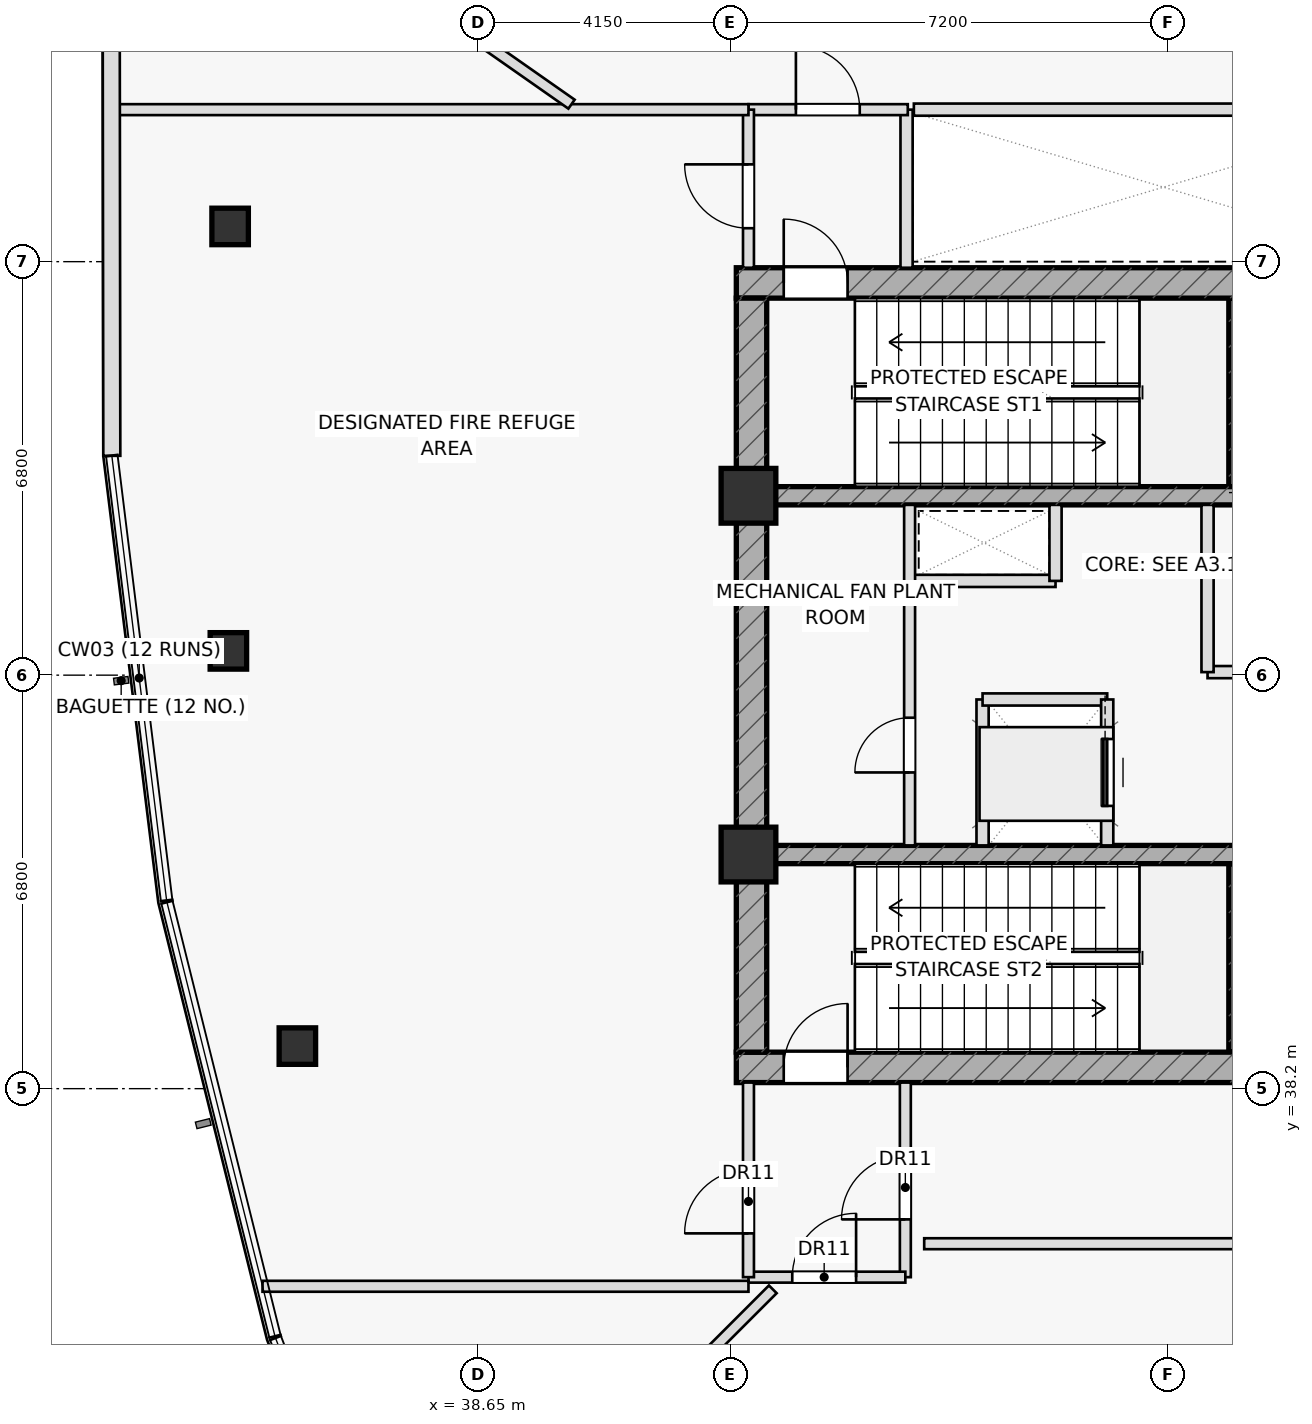
"""IFC4 building model, lengths in metres.
Left out: names, types, materials, properties, quantities, classifications, styles, units other than length and angle.
Written with IfcOpenShell. Run it as: python <this file> out.ifc"""

import sys

from ifc_helpers import new_model, si_unit, direction, frame, frame_2d, origin, origin_2d, place, context, subcontext, project, spatial, rectangle, hollow_rectangle, extrude, element, fill, save


model = new_model("IFC4")
c1 = context("Model", 3, precision=1e-05, world=origin(), true_north=direction((0.0, 1.0)))
c2 = subcontext(c1, "Body", "Model", "MODEL_VIEW")
j1 = project(units=[si_unit("LENGTHUNIT", "METRE"), si_unit("PLANEANGLEUNIT", "RADIAN")], contexts=[c1])
p1 = place(None, origin())
s1 = spatial("IfcSite", under=j1, at=p1, CompositionType="ELEMENT")
p2 = place(p1, origin())
s2 = spatial("IfcBuilding", under=s1, at=p2, CompositionType="ELEMENT")
p3 = place(p2, frame((0.0, 0.0, 204.15)))
s3 = spatial("IfcBuildingStorey", under=s2, at=p3, CompositionType="ELEMENT", Elevation=204.15)
for number, where, z_axis, x_axis in (
    (1, (51.11, 48.1, 0.0), (0.0, 0.0, 1.0), (0.0, 1.0, 0.0)),
    (2, (51.11, 38.8, 0.0), (0.0, 0.0, 1.0), (0.0, 1.0, 0.0)),
):
    element("IfcWall", number, at=place(p3, frame(where, z_axis=z_axis, x_axis=x_axis)), inside=s3, PredefinedType="SHEAR", context=c2, shape_type="SweptSolid", body=[
        extrude(rectangle(XDim=3.1, YDim=0.22, at=frame_2d((1.55, 0.0))), origin(), (0.0, 0.0, 1.0), 4.55),
    ])
p4 = place(p3, frame((42.9, 51.45, 0.0), z_axis=(0.0, 0.0, 1.0), x_axis=(1.0, 0.0, 0.0)))
e3 = element("IfcWall", 3, at=p4, inside=s3, PredefinedType="SHEAR", context=c2, shape_type="SweptSolid", body=[
    extrude(rectangle(XDim=14.2, YDim=0.5, at=frame_2d((7.1, 0.0))), origin(), (0.0, 0.0, 1.0), 4.55),
])
p5 = place(p4, frame((0.78, 0.0, 0.0)))
e4 = element("IfcOpeningElement", 4, at=p5, cuts=e3, PredefinedType="OPENING", context=c2, shape_type="SweptSolid", body=[
    extrude(rectangle(XDim=1.05, YDim=2.2, at=frame_2d((0.525, 1.1))), frame((0.0, 0.26, 0.0), z_axis=(0.0, -1.0, 0.0), x_axis=(1.0, 0.0, 0.0)), (0.0, 0.0, 1.0), 0.52),
])
p6 = place(p3, frame((42.9, 38.55, 0.0), z_axis=(0.0, 0.0, 1.0), x_axis=(1.0, 0.0, 0.0)))
e5 = element("IfcWall", 5, at=p6, inside=s3, PredefinedType="SHEAR", context=c2, shape_type="SweptSolid", body=[
    extrude(rectangle(XDim=14.2, YDim=0.5, at=frame_2d((7.1, 0.0))), origin(), (0.0, 0.0, 1.0), 4.55),
])
p7 = place(p6, frame((0.78, 0.0, 0.0)))
e6 = element("IfcOpeningElement", 6, at=p7, cuts=e5, PredefinedType="OPENING", context=c2, shape_type="SweptSolid", body=[
    extrude(rectangle(XDim=1.05, YDim=2.2, at=frame_2d((0.525, 1.1))), frame((0.0, 0.26, 0.0), z_axis=(0.0, -1.0, 0.0), x_axis=(1.0, 0.0, 0.0)), (0.0, 0.0, 1.0), 0.52),
])
p8 = place(p3, frame((43.15, 38.8, 0.0), z_axis=(0.0, 0.0, 1.0), x_axis=(0.0, 1.0, 0.0)))
e7 = element("IfcWall", 7, at=p8, inside=s3, PredefinedType="SHEAR", context=c2, shape_type="SweptSolid", body=[
    extrude(rectangle(XDim=12.4, YDim=0.5, at=frame_2d((6.2, 0.0))), origin(), (0.0, 0.0, 1.0), 4.55),
])
p9 = place(p3, frame((43.4, 47.95, 0.0), z_axis=(0.0, 0.0, 1.0), x_axis=(1.0, 0.0, 0.0)))
e8 = element("IfcWall", 8, at=p9, inside=s3, PredefinedType="SHEAR", context=c2, shape_type="SweptSolid", body=[
    extrude(rectangle(XDim=13.2, YDim=0.3, at=frame_2d((6.6, 0.0))), origin(), (0.0, 0.0, 1.0), 4.55),
])
p10 = place(p9, frame((8.345, 0.0, 0.0)))
e9 = element("IfcOpeningElement", 9, at=p10, cuts=e8, PredefinedType="OPENING", context=c2, shape_type="SweptSolid", body=[
    extrude(rectangle(XDim=1.15, YDim=2.2, at=frame_2d((0.575, 1.1))), frame((0.0, 0.16, 0.0), z_axis=(0.0, -1.0, 0.0), x_axis=(1.0, 0.0, 0.0)), (0.0, 0.0, 1.0), 0.32),
])
p11 = place(p9, frame((10.065, 0.0, 0.0)))
e10 = element("IfcOpeningElement", 10, at=p11, cuts=e8, PredefinedType="OPENING", context=c2, shape_type="SweptSolid", body=[
    extrude(rectangle(XDim=1.15, YDim=2.2, at=frame_2d((0.575, 1.1))), frame((0.0, 0.16, 0.0), z_axis=(0.0, -1.0, 0.0), x_axis=(1.0, 0.0, 0.0)), (0.0, 0.0, 1.0), 0.32),
])
p12 = place(p9, frame((11.645, 0.0, 0.0)))
e11 = element("IfcOpeningElement", 11, at=p12, cuts=e8, PredefinedType="OPENING", context=c2, shape_type="SweptSolid", body=[
    extrude(rectangle(XDim=1.15, YDim=2.2, at=frame_2d((0.575, 1.1))), frame((0.0, 0.16, 0.0), z_axis=(0.0, -1.0, 0.0), x_axis=(1.0, 0.0, 0.0)), (0.0, 0.0, 1.0), 0.32),
])
p13 = place(p3, frame((43.4, 42.05, 0.0), z_axis=(0.0, 0.0, 1.0), x_axis=(1.0, 0.0, 0.0)))
e12 = element("IfcWall", 12, at=p13, inside=s3, PredefinedType="SHEAR", context=c2, shape_type="SweptSolid", body=[
    extrude(rectangle(XDim=13.2, YDim=0.3, at=frame_2d((6.6, 0.0))), origin(), (0.0, 0.0, 1.0), 4.55),
])
p14 = place(p13, frame((8.37, 0.0, 0.0)))
e13 = element("IfcOpeningElement", 13, at=p14, cuts=e12, PredefinedType="OPENING", context=c2, shape_type="SweptSolid", body=[
    extrude(rectangle(XDim=1.1, YDim=2.15, at=frame_2d((0.55, 1.075))), frame((0.0, 0.16, 0.0), z_axis=(0.0, -1.0, 0.0), x_axis=(1.0, 0.0, 0.0)), (0.0, 0.0, 1.0), 0.32),
])
p15 = place(p13, frame((10.09, 0.0, 0.0)))
e14 = element("IfcOpeningElement", 14, at=p15, cuts=e12, PredefinedType="OPENING", context=c2, shape_type="SweptSolid", body=[
    extrude(rectangle(XDim=1.1, YDim=2.15, at=frame_2d((0.55, 1.075))), frame((0.0, 0.16, 0.0), z_axis=(0.0, -1.0, 0.0), x_axis=(1.0, 0.0, 0.0)), (0.0, 0.0, 1.0), 0.32),
])
p16 = place(p13, frame((11.83, 0.0, 0.0)))
e15 = element("IfcOpeningElement", 15, at=p16, cuts=e12, PredefinedType="OPENING", context=c2, shape_type="SweptSolid", body=[
    extrude(rectangle(XDim=1.1, YDim=2.15, at=frame_2d((0.55, 1.075))), frame((0.0, 0.16, 0.0), z_axis=(0.0, -1.0, 0.0), x_axis=(1.0, 0.0, 0.0)), (0.0, 0.0, 1.0), 0.32),
])
for number, where, z_axis, x_axis in (
    (16, (43.1, 47.95, 0.0), (0.0, 0.0, 1.0), (1.0, 0.0, 0.0)),
    (17, (43.1, 42.05, 0.0), (0.0, 0.0, 1.0), (1.0, 0.0, 0.0)),
):
    element("IfcColumn", number, at=place(p3, frame(where, z_axis=z_axis, x_axis=x_axis)), inside=s3, PredefinedType="COLUMN", context=c2, shape_type="SweptSolid", body=[
        extrude(rectangle(XDim=0.9, YDim=0.9, at=origin_2d()), origin(), (0.0, 0.0, 1.0), 4.55),
    ])
for number, where, z_axis, x_axis in (
    (18, (34.575, 52.379, 0.0), (0.0, 0.0, 1.0), (1.0, 0.0, 0.0)),
    (19, (34.546, 45.399, 0.0), (0.0, 0.0, 1.0), (1.0, 0.0, 0.0)),
    (20, (35.681, 38.9, 0.0), (0.0, 0.0, 1.0), (1.0, 0.0, 0.0)),
):
    element("IfcColumn", number, at=place(p3, frame(where, z_axis=z_axis, x_axis=x_axis)), inside=s3, PredefinedType="COLUMN", context=c2, shape_type="SweptSolid", body=[
        extrude(hollow_rectangle(XDim=0.6, YDim=0.6, WallThickness=0.036, at=origin_2d()), origin(), (0.0, 0.0, 1.0), 4.55),
    ])
p17 = place(p3, frame((45.7, 51.7, 0.0), z_axis=(0.0, 0.0, 1.0), x_axis=(0.0, 1.0, 0.0)))
e21 = element("IfcWall", 21, at=p17, inside=s3, PredefinedType="PARTITIONING", context=c2, shape_type="SweptSolid", body=[
    extrude(rectangle(XDim=2.6, YDim=0.2, at=frame_2d((1.3, 0.0))), origin(), (0.0, 0.0, 1.0), 4.55),
])
p18 = place(p3, frame((45.75, 46.55, 0.0), z_axis=(0.0, 0.0, 1.0), x_axis=(1.0, 0.0, 0.0)))
e22 = element("IfcWall", 22, at=p18, inside=s3, PredefinedType="PARTITIONING", context=c2, shape_type="SweptSolid", body=[
    extrude(rectangle(XDim=2.4, YDim=0.2, at=frame_2d((1.2, 0.0))), origin(), (0.0, 0.0, 1.0), 4.55),
])
p19 = place(p3, frame((48.15, 46.55, 0.0), z_axis=(0.0, 0.0, 1.0), x_axis=(0.0, 1.0, 0.0)))
e23 = element("IfcWall", 23, at=p19, inside=s3, PredefinedType="PARTITIONING", context=c2, shape_type="SweptSolid", body=[
    extrude(rectangle(XDim=1.25, YDim=0.2, at=frame_2d((0.625, 0.0))), origin(), (0.0, 0.0, 1.0), 4.55),
])
p20 = place(p3, frame((46.95, 42.2, 0.0), z_axis=(0.0, 0.0, 1.0), x_axis=(0.0, 1.0, 0.0)))
e24 = element("IfcWall", 24, at=p20, inside=s3, PredefinedType="PARTITIONING", context=c2, shape_type="SweptSolid", body=[
    extrude(rectangle(XDim=2.4, YDim=0.2, at=frame_2d((1.2, 0.0))), origin(), (0.0, 0.0, 1.0), 4.55),
])
p21 = place(p3, frame((46.95, 44.6, 0.0), z_axis=(0.0, 0.0, 1.0), x_axis=(1.0, 0.0, 0.0)))
e25 = element("IfcWall", 25, at=p21, inside=s3, PredefinedType="PARTITIONING", context=c2, shape_type="SweptSolid", body=[
    extrude(rectangle(XDim=2.05, YDim=0.2, at=frame_2d((1.025, 0.0))), origin(), (0.0, 0.0, 1.0), 4.55),
])
p22 = place(p3, frame((50.65, 45.05, 0.0), z_axis=(0.0, 0.0, 1.0), x_axis=(1.0, 0.0, 0.0)))
e26 = element("IfcWall", 26, at=p22, inside=s3, PredefinedType="PARTITIONING", context=c2, shape_type="SweptSolid", body=[
    extrude(rectangle(XDim=5.95, YDim=0.2, at=frame_2d((2.975, 0.0))), origin(), (0.0, 0.0, 1.0), 4.55),
])
p23 = place(p22, frame((1.35, 0.0, 0.0)))
e27 = element("IfcOpeningElement", 27, at=p23, cuts=e26, PredefinedType="OPENING", context=c2, shape_type="SweptSolid", body=[
    extrude(rectangle(XDim=1.5, YDim=2.2, at=frame_2d((0.75, 1.1))), frame((0.0, 0.11, 0.0), z_axis=(0.0, -1.0, 0.0), x_axis=(1.0, 0.0, 0.0)), (0.0, 0.0, 1.0), 0.22),
])
p24 = place(p3, frame((50.65, 45.05, 0.0), z_axis=(0.0, 0.0, 1.0), x_axis=(0.0, 1.0, 0.0)))
e28 = element("IfcWall", 28, at=p24, inside=s3, PredefinedType="PARTITIONING", context=c2, shape_type="SweptSolid", body=[
    extrude(rectangle(XDim=2.75, YDim=0.2, at=frame_2d((1.375, 0.0))), origin(), (0.0, 0.0, 1.0), 4.55),
])
p25 = place(p3, frame((45.75, 42.2, 0.0), z_axis=(0.0, 0.0, 1.0), x_axis=(0.0, 1.0, 0.0)))
e29 = element("IfcWall", 29, at=p25, inside=s3, PredefinedType="PARTITIONING", context=c2, shape_type="SweptSolid", body=[
    extrude(rectangle(XDim=5.6, YDim=0.18, at=frame_2d((2.8, 0.0))), origin(), (0.0, 0.0, 1.0), 4.55),
])
p26 = place(p25, frame((1.2, 0.0, 0.0)))
e30 = element("IfcOpeningElement", 30, at=p26, cuts=e29, PredefinedType="OPENING", context=c2, shape_type="SweptSolid", body=[
    extrude(rectangle(XDim=0.9, YDim=2.05, at=frame_2d((0.45, 1.025))), frame((0.0, 0.1, 0.0), z_axis=(0.0, -1.0, 0.0), x_axis=(1.0, 0.0, 0.0)), (0.0, 0.0, 1.0), 0.2),
])
p27 = place(p3, frame((43.1, 54.3, 0.0), z_axis=(0.0, 0.0, 1.0), x_axis=(1.0, 0.0, 0.0)))
e31 = element("IfcWall", 31, at=p27, inside=s3, PredefinedType="PARTITIONING", context=c2, shape_type="SweptSolid", body=[
    extrude(rectangle(XDim=2.62, YDim=0.18, at=frame_2d((1.31, 0.0))), origin(), (0.0, 0.0, 1.0), 4.55),
])
p28 = place(p27, frame((0.78, 0.0, 0.0)))
e32 = element("IfcOpeningElement", 32, at=p28, cuts=e31, PredefinedType="OPENING", context=c2, shape_type="SweptSolid", body=[
    extrude(rectangle(XDim=1.05, YDim=2.2, at=frame_2d((0.525, 1.1))), frame((0.0, 0.1, 0.0), z_axis=(0.0, -1.0, 0.0), x_axis=(1.0, 0.0, 0.0)), (0.0, 0.0, 1.0), 0.2),
])
p29 = place(p3, frame((45.68, 35.1, 0.0), z_axis=(0.0, 0.0, 1.0), x_axis=(0.0, 1.0, 0.0)))
e33 = element("IfcWall", 33, at=p29, inside=s3, PredefinedType="PARTITIONING", context=c2, shape_type="SweptSolid", body=[
    extrude(rectangle(XDim=3.2, YDim=0.18, at=frame_2d((1.6, 0.0))), origin(), (0.0, 0.0, 1.0), 4.55),
])
p30 = place(p29, frame((0.95, 0.0, 0.0)))
e34 = element("IfcOpeningElement", 34, at=p30, cuts=e33, PredefinedType="OPENING", context=c2, shape_type="SweptSolid", body=[
    extrude(rectangle(XDim=1.05, YDim=2.2, at=frame_2d((0.525, 1.1))), frame((0.0, 0.1, 0.0), z_axis=(0.0, -1.0, 0.0), x_axis=(1.0, 0.0, 0.0)), (0.0, 0.0, 1.0), 0.2),
])
p31 = place(p3, frame((43.1, 35.1, 0.0), z_axis=(0.0, 0.0, 1.0), x_axis=(1.0, 0.0, 0.0)))
e35 = element("IfcWall", 35, at=p31, inside=s3, PredefinedType="PARTITIONING", context=c2, shape_type="SweptSolid", body=[
    extrude(rectangle(XDim=2.58, YDim=0.18, at=frame_2d((1.29, 0.0))), origin(), (0.0, 0.0, 1.0), 3.935),
])
p32 = place(p31, frame((0.72, 0.0, 0.0)))
e36 = element("IfcOpeningElement", 36, at=p32, cuts=e35, PredefinedType="OPENING", context=c2, shape_type="SweptSolid", body=[
    extrude(rectangle(XDim=1.05, YDim=2.2, at=frame_2d((0.525, 1.1))), frame((0.0, 0.1, 0.0), z_axis=(0.0, -1.0, 0.0), x_axis=(1.0, 0.0, 0.0)), (0.0, 0.0, 1.0), 0.2),
])
p33 = place(p3, frame((43.1, 51.7, 0.0), z_axis=(0.0, 0.0, 1.0), x_axis=(0.0, 1.0, 0.0)))
e37 = element("IfcWall", 37, at=p33, inside=s3, PredefinedType="PARTITIONING", context=c2, shape_type="SweptSolid", body=[
    extrude(rectangle(XDim=2.6, YDim=0.18, at=frame_2d((1.3, 0.0))), origin(), (0.0, 0.0, 1.0), 3.935),
])
p34 = place(p33, frame((0.65, 0.0, 0.0)))
e38 = element("IfcOpeningElement", 38, at=p34, cuts=e37, PredefinedType="OPENING", context=c2, shape_type="SweptSolid", body=[
    extrude(rectangle(XDim=1.05, YDim=2.2, at=frame_2d((0.525, 1.1))), frame((0.0, 0.1, 0.0), z_axis=(0.0, -1.0, 0.0), x_axis=(1.0, 0.0, 0.0)), (0.0, 0.0, 1.0), 0.2),
])
p35 = place(p3, frame((43.1, 35.1, 0.0), z_axis=(0.0, 0.0, 1.0), x_axis=(0.0, 1.0, 0.0)))
e39 = element("IfcWall", 39, at=p35, inside=s3, PredefinedType="PARTITIONING", context=c2, shape_type="SweptSolid", body=[
    extrude(rectangle(XDim=3.2, YDim=0.18, at=frame_2d((1.6, 0.0))), origin(), (0.0, 0.0, 1.0), 3.935),
])
p36 = place(p35, frame((0.72, 0.0, 0.0)))
e40 = element("IfcOpeningElement", 40, at=p36, cuts=e39, PredefinedType="OPENING", context=c2, shape_type="SweptSolid", body=[
    extrude(rectangle(XDim=1.05, YDim=2.2, at=frame_2d((0.525, 1.1))), frame((0.0, 0.1, 0.0), z_axis=(0.0, -1.0, 0.0), x_axis=(1.0, 0.0, 0.0)), (0.0, 0.0, 1.0), 0.2),
])
p37 = place(p3, frame((32.622, 54.3, 0.0), z_axis=(0.0, 0.0, 1.0), x_axis=(1.0, 0.0, 0.0)))
e41 = element("IfcWall", 41, at=p37, inside=s3, PredefinedType="PARTITIONING", context=c2, shape_type="SweptSolid", body=[
    extrude(rectangle(XDim=10.478, YDim=0.18, at=frame_2d((5.239, 0.0))), origin(), (0.0, 0.0, 1.0), 3.935),
])
p38 = place(p3, frame((35.108, 34.95, 0.0), z_axis=(0.0, 0.0, 1.0), x_axis=(1.0, 0.0, 0.0)))
e42 = element("IfcWall", 42, at=p38, inside=s3, PredefinedType="PARTITIONING", context=c2, shape_type="SweptSolid", body=[
    extrude(rectangle(XDim=7.992, YDim=0.18, at=frame_2d((3.996, 0.0))), origin(), (0.0, 0.0, 1.0), 3.935),
])
p39 = place(p3, frame((40.19, 54.39, 0.0), z_axis=(0.0, 0.0, 1.0), x_axis=(-0.819137421145, 0.573597319799, 0.0)))
e43 = element("IfcWall", 43, at=p39, inside=s3, PredefinedType="PARTITIONING", context=c2, shape_type="SweptSolid", body=[
    extrude(rectangle(XDim=8.74, YDim=0.18, at=frame_2d((4.37, 0.0))), origin(), (0.0, 0.0, 1.0), 4.025),
])
p40 = place(p3, frame((43.5, 34.9, 0.0), z_axis=(0.0, 0.0, 1.0), x_axis=(-0.707106781187, -0.707106781187, 0.0)))
e44 = element("IfcWall", 44, at=p40, inside=s3, PredefinedType="PARTITIONING", context=c2, shape_type="SweptSolid", body=[
    extrude(rectangle(XDim=8.68, YDim=0.18, at=frame_2d((4.34, 0.0))), origin(), (0.0, 0.0, 1.0), 3.935),
])
p41 = place(p3, frame((59.57, 35.65, 0.0), z_axis=(0.0, 0.0, 1.0), x_axis=(-1.0, 0.0, 0.0)))
e45 = element("IfcWall", 45, at=p41, inside=s3, PredefinedType="PARTITIONING", context=c2, shape_type="SweptSolid", body=[
    extrude(rectangle(XDim=13.58, YDim=0.18, at=frame_2d((6.79, 0.0))), origin(), (0.0, 0.0, 1.0), 3.935),
])
p42 = place(p3, frame((32.62, 56.012, 0.0), z_axis=(0.0, 0.0, 1.0), x_axis=(0.001285854525, -0.999999173289, 0.0)))
e46 = element("IfcWall", 46, at=p42, inside=s3, PredefinedType="STANDARD", context=c2, shape_type="SweptSolid", body=[
    extrude(rectangle(XDim=7.405, YDim=0.28, at=frame_2d((3.702, 0.0))), origin(), (0.0, 0.0, 1.0), 4.55),
])
p43 = place(p3, frame((49.0, 42.2, 0.0), z_axis=(0.0, 0.0, 1.0), x_axis=(0.0, 1.0, 0.0)))
e47 = element("IfcWall", 47, at=p43, inside=s3, PredefinedType="PARTITIONING", context=c2, shape_type="SweptSolid", body=[
    extrude(rectangle(XDim=2.4, YDim=0.2, at=frame_2d((1.2, 0.0))), origin(), (0.0, 0.0, 1.0), 4.55),
])
p44 = place(p43, frame((0.65, 0.0, 0.0)))
e48 = element("IfcOpeningElement", 48, at=p44, cuts=e47, PredefinedType="OPENING", context=c2, shape_type="SweptSolid", body=[
    extrude(rectangle(XDim=1.1, YDim=2.15, at=frame_2d((0.55, 1.075))), frame((0.0, 0.11, 0.0), z_axis=(0.0, -1.0, 0.0), x_axis=(1.0, 0.0, 0.0)), (0.0, 0.0, 1.0), 0.22),
])
p45 = place(p3, frame((45.82, 54.3, 0.0), z_axis=(0.0, 0.0, 1.0), x_axis=(1.0, 0.0, 0.0)))
e49 = element("IfcWall", 49, at=p45, inside=s3, PredefinedType="PARTITIONING", context=c2, shape_type="SweptSolid", body=[
    extrude(rectangle(XDim=8.31, YDim=0.2, at=frame_2d((4.155, 0.0))), origin(), (0.0, 0.0, 1.0), 4.55),
])
p46 = place(p5, origin())
e50 = element("IfcDoor", 50, at=p46, inside=s3, OperationType="SINGLE_SWING_LEFT", PredefinedType="DOOR", context=c2, shape_type="SweptSolid", body=[
    extrude(rectangle(XDim=1.05, YDim=2.2, at=frame_2d((0.525, 1.1))), frame((0.0, 0.025, 0.0), z_axis=(0.0, -1.0, 0.0), x_axis=(1.0, 0.0, 0.0)), (0.0, 0.0, 1.0), 0.05),
])
fill(e4, e50)
p47 = place(p7, origin())
e51 = element("IfcDoor", 51, at=p47, inside=s3, OperationType="SINGLE_SWING_RIGHT", PredefinedType="DOOR", context=c2, shape_type="SweptSolid", body=[
    extrude(rectangle(XDim=1.05, YDim=2.2, at=frame_2d((0.525, 1.1))), frame((0.0, 0.025, 0.0), z_axis=(0.0, -1.0, 0.0), x_axis=(1.0, 0.0, 0.0)), (0.0, 0.0, 1.0), 0.05),
])
fill(e6, e51)
p48 = place(p26, origin())
e52 = element("IfcDoor", 52, at=p48, inside=s3, OperationType="SINGLE_SWING_LEFT", PredefinedType="DOOR", context=c2, shape_type="SweptSolid", body=[
    extrude(rectangle(XDim=0.9, YDim=2.05, at=frame_2d((0.45, 1.025))), frame((0.0, 0.025, 0.0), z_axis=(0.0, -1.0, 0.0), x_axis=(1.0, 0.0, 0.0)), (0.0, 0.0, 1.0), 0.05),
])
fill(e30, e52)
p49 = place(p28, origin())
e53 = element("IfcDoor", 53, at=p49, inside=s3, OperationType="SINGLE_SWING_LEFT", PredefinedType="DOOR", context=c2, shape_type="SweptSolid", body=[
    extrude(rectangle(XDim=1.05, YDim=2.2, at=frame_2d((0.525, 1.1))), frame((0.0, 0.025, 0.0), z_axis=(0.0, -1.0, 0.0), x_axis=(1.0, 0.0, 0.0)), (0.0, 0.0, 1.0), 0.05),
])
fill(e32, e53)
p50 = place(p30, origin())
e54 = element("IfcDoor", 54, at=p50, inside=s3, OperationType="SINGLE_SWING_LEFT", PredefinedType="DOOR", context=c2, shape_type="SweptSolid", body=[
    extrude(rectangle(XDim=1.05, YDim=2.2, at=frame_2d((0.525, 1.1))), frame((0.0, 0.025, 0.0), z_axis=(0.0, -1.0, 0.0), x_axis=(1.0, 0.0, 0.0)), (0.0, 0.0, 1.0), 0.05),
])
fill(e34, e54)
p51 = place(p32, origin())
e55 = element("IfcDoor", 55, at=p51, inside=s3, OperationType="SINGLE_SWING_RIGHT", PredefinedType="DOOR", context=c2, shape_type="SweptSolid", body=[
    extrude(rectangle(XDim=1.05, YDim=2.2, at=frame_2d((0.525, 1.1))), frame((0.0, 0.025, 0.0), z_axis=(0.0, -1.0, 0.0), x_axis=(1.0, 0.0, 0.0)), (0.0, 0.0, 1.0), 0.05),
])
fill(e36, e55)
p52 = place(p34, origin())
e56 = element("IfcDoor", 56, at=p52, inside=s3, OperationType="SINGLE_SWING_RIGHT", PredefinedType="DOOR", context=c2, shape_type="SweptSolid", body=[
    extrude(rectangle(XDim=1.05, YDim=2.2, at=frame_2d((0.525, 1.1))), frame((0.0, 0.025, 0.0), z_axis=(0.0, -1.0, 0.0), x_axis=(1.0, 0.0, 0.0)), (0.0, 0.0, 1.0), 0.05),
])
fill(e38, e56)
p53 = place(p36, origin())
e57 = element("IfcDoor", 57, at=p53, inside=s3, OperationType="SINGLE_SWING_LEFT", PredefinedType="DOOR", context=c2, shape_type="SweptSolid", body=[
    extrude(rectangle(XDim=1.05, YDim=2.2, at=frame_2d((0.525, 1.1))), frame((0.0, 0.025, 0.0), z_axis=(0.0, -1.0, 0.0), x_axis=(1.0, 0.0, 0.0)), (0.0, 0.0, 1.0), 0.05),
])
fill(e40, e57)
p54 = place(p44, origin())
e58 = element("IfcDoor", 58, at=p54, inside=s3, OperationType="SLIDING_TO_RIGHT", PredefinedType="DOOR", context=c2, shape_type="SweptSolid", body=[
    extrude(rectangle(XDim=1.1, YDim=2.15, at=frame_2d((0.55, 1.075))), frame((0.0, 0.025, 0.0), z_axis=(0.0, -1.0, 0.0), x_axis=(1.0, 0.0, 0.0)), (0.0, 0.0, 1.0), 0.05),
])
fill(e48, e58)
save(model, sys.argv[1])
